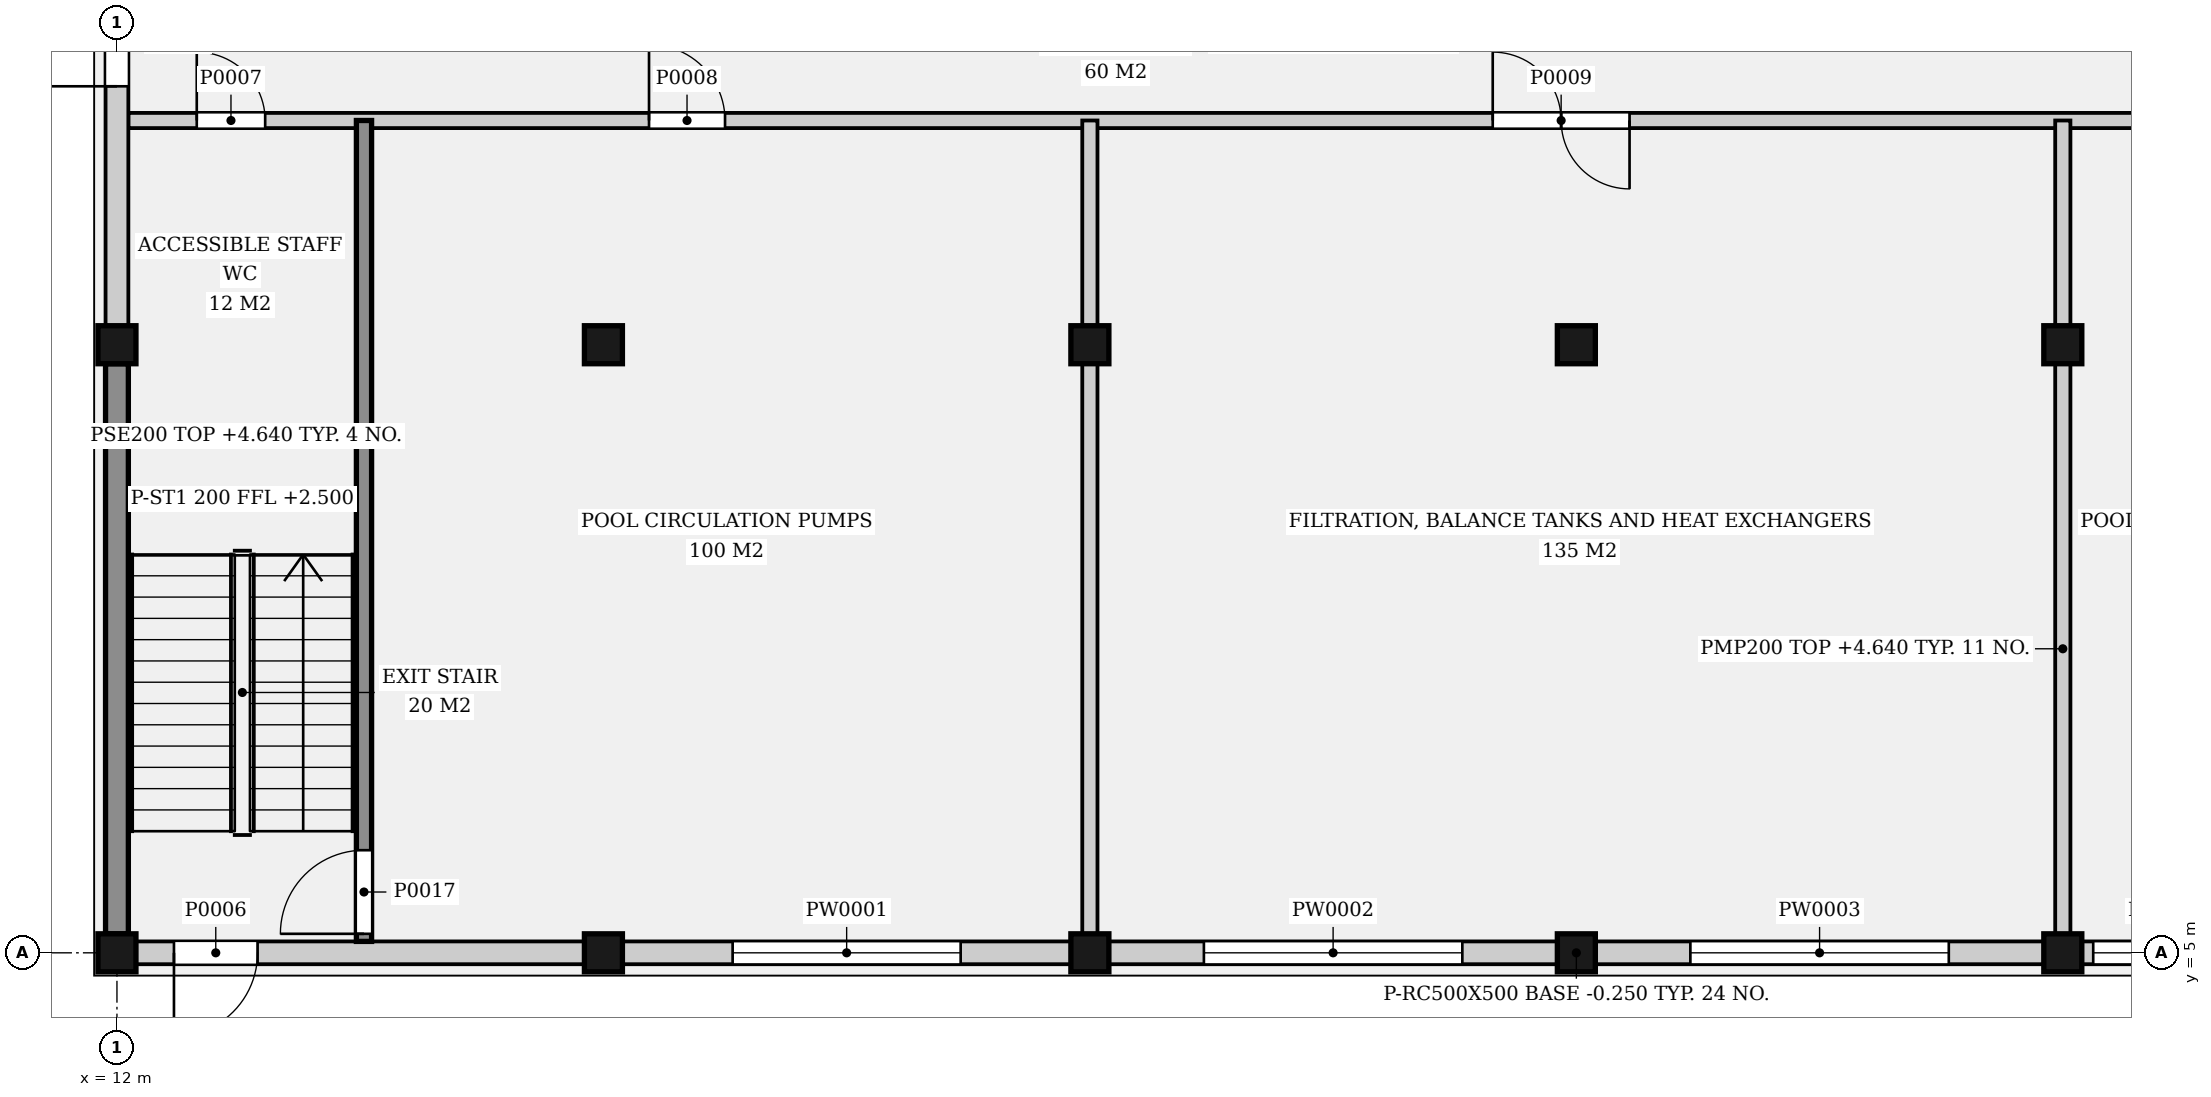
"""IFC4 building model, lengths in metres.
Left out: names, types, materials, properties, quantities, classifications, styles, units other than length and angle.
Written with IfcOpenShell. Run it as: python <this file> out.ifc"""

import sys

from ifc_helpers import new_model, si_unit, direction, frame, frame_2d, origin, origin_2d, place, context, subcontext, project, spatial, rectangle, extrude, element, fill, save


model = new_model("IFC4")
c1 = context("Model", 3, precision=1e-05, world=origin(), true_north=direction((0.0, 1.0)))
c2 = subcontext(c1, "Body", "Model", "MODEL_VIEW")
j1 = project(units=[si_unit("LENGTHUNIT", "METRE"), si_unit("PLANEANGLEUNIT", "RADIAN")], contexts=[c1])
p1 = place(None, origin())
s1 = spatial("IfcSite", under=j1, at=p1, CompositionType="ELEMENT")
p2 = place(p1, origin())
s2 = spatial("IfcBuilding", under=s1, at=p2, CompositionType="ELEMENT")
p3 = place(p2, origin())
s3 = spatial("IfcBuildingStorey", under=s2, at=p3, CompositionType="ELEMENT", Elevation=0.0)
for number, where, z_axis, x_axis in (
    (1, (12.0, 5.0, -0.25), (0.0, 0.0, 1.0), (1.0, 0.0, 0.0)),
    (2, (12.0, 13.0, -0.25), (0.0, 0.0, 1.0), (1.0, 0.0, 0.0)),
    (3, (18.4, 5.0, -0.25), (0.0, 0.0, 1.0), (1.0, 0.0, 0.0)),
    (4, (18.4, 13.0, -0.25), (0.0, 0.0, 1.0), (1.0, 0.0, 0.0)),
    (5, (24.8, 5.0, -0.25), (0.0, 0.0, 1.0), (1.0, 0.0, 0.0)),
    (6, (24.8, 13.0, -0.25), (0.0, 0.0, 1.0), (1.0, 0.0, 0.0)),
    (7, (31.2, 5.0, -0.25), (0.0, 0.0, 1.0), (1.0, 0.0, 0.0)),
    (8, (31.2, 13.0, -0.25), (0.0, 0.0, 1.0), (1.0, 0.0, 0.0)),
    (9, (37.6, 5.0, -0.25), (0.0, 0.0, 1.0), (1.0, 0.0, 0.0)),
    (10, (37.6, 13.0, -0.25), (0.0, 0.0, 1.0), (1.0, 0.0, 0.0)),
):
    element("IfcColumn", number, at=place(p3, frame(where, z_axis=z_axis, x_axis=x_axis)), inside=s3, PredefinedType="COLUMN", context=c2, shape_type="SweptSolid", body=[
        extrude(rectangle(XDim=0.5, YDim=0.5, at=origin_2d()), origin(), (0.0, 0.0, 1.0), 5.25),
    ])
p4 = place(p3, frame((12.25, 5.0, 0.0), z_axis=(0.0, 0.0, 1.0), x_axis=(1.0, 0.0, 0.0)))
e11 = element("IfcWall", 11, at=p4, inside=s3, PredefinedType="SOLIDWALL", context=c2, shape_type="SweptSolid", body=[
    extrude(rectangle(XDim=5.9, YDim=0.3, at=frame_2d((2.95, 0.0))), origin(), (0.0, 0.0, 1.0), 4.64),
])
p5 = place(p4, frame((1.6, 0.0, 0.0), z_axis=(0.0, 0.0, 1.0), x_axis=(-1.0, 0.0, 0.0)))
e12 = element("IfcOpeningElement", 12, at=p5, cuts=e11, PredefinedType="OPENING", context=c2, shape_type="SweptSolid", body=[
    extrude(rectangle(XDim=1.1, YDim=2.1, at=frame_2d((0.55, 1.05))), frame((0.0, 0.16, 0.0), z_axis=(0.0, -1.0, 0.0), x_axis=(1.0, 0.0, 0.0)), (0.0, 0.0, 1.0), 0.32),
])
p6 = place(p3, frame((18.65, 5.0, 0.0), z_axis=(0.0, 0.0, 1.0), x_axis=(1.0, 0.0, 0.0)))
e13 = element("IfcWall", 13, at=p6, inside=s3, PredefinedType="SOLIDWALL", context=c2, shape_type="SweptSolid", body=[
    extrude(rectangle(XDim=5.9, YDim=0.3, at=frame_2d((2.95, 0.0))), origin(), (0.0, 0.0, 1.0), 4.64),
])
p7 = place(p6, frame((1.45, 0.0, 0.6)))
e14 = element("IfcOpeningElement", 14, at=p7, cuts=e13, PredefinedType="OPENING", context=c2, shape_type="SweptSolid", body=[
    extrude(rectangle(XDim=3.0, YDim=2.8, at=frame_2d((1.5, 1.4))), frame((0.0, 0.16, 0.0), z_axis=(0.0, -1.0, 0.0), x_axis=(1.0, 0.0, 0.0)), (0.0, 0.0, 1.0), 0.32),
])
p8 = place(p3, frame((25.05, 5.0, 0.0), z_axis=(0.0, 0.0, 1.0), x_axis=(1.0, 0.0, 0.0)))
e15 = element("IfcWall", 15, at=p8, inside=s3, PredefinedType="SOLIDWALL", context=c2, shape_type="SweptSolid", body=[
    extrude(rectangle(XDim=5.9, YDim=0.3, at=frame_2d((2.95, 0.0))), origin(), (0.0, 0.0, 1.0), 4.64),
])
p9 = place(p8, frame((1.25, 0.0, 0.6)))
e16 = element("IfcOpeningElement", 16, at=p9, cuts=e15, PredefinedType="OPENING", context=c2, shape_type="SweptSolid", body=[
    extrude(rectangle(XDim=3.4, YDim=2.8, at=frame_2d((1.7, 1.4))), frame((0.0, 0.16, 0.0), z_axis=(0.0, -1.0, 0.0), x_axis=(1.0, 0.0, 0.0)), (0.0, 0.0, 1.0), 0.32),
])
p10 = place(p3, frame((31.45, 5.0, 0.0), z_axis=(0.0, 0.0, 1.0), x_axis=(1.0, 0.0, 0.0)))
e17 = element("IfcWall", 17, at=p10, inside=s3, PredefinedType="SOLIDWALL", context=c2, shape_type="SweptSolid", body=[
    extrude(rectangle(XDim=5.9, YDim=0.3, at=frame_2d((2.95, 0.0))), origin(), (0.0, 0.0, 1.0), 4.64),
])
p11 = place(p10, frame((1.25, 0.0, 0.6)))
e18 = element("IfcOpeningElement", 18, at=p11, cuts=e17, PredefinedType="OPENING", context=c2, shape_type="SweptSolid", body=[
    extrude(rectangle(XDim=3.4, YDim=2.8, at=frame_2d((1.7, 1.4))), frame((0.0, 0.16, 0.0), z_axis=(0.0, -1.0, 0.0), x_axis=(1.0, 0.0, 0.0)), (0.0, 0.0, 1.0), 0.32),
])
p12 = place(p3, frame((37.85, 5.0, 0.0), z_axis=(0.0, 0.0, 1.0), x_axis=(1.0, 0.0, 0.0)))
e19 = element("IfcWall", 19, at=p12, inside=s3, PredefinedType="SOLIDWALL", context=c2, shape_type="SweptSolid", body=[
    extrude(rectangle(XDim=5.9, YDim=0.3, at=frame_2d((2.95, 0.0))), origin(), (0.0, 0.0, 1.0), 4.64),
])
p13 = place(p12, frame((0.15, 0.0, 0.9)))
e20 = element("IfcOpeningElement", 20, at=p13, cuts=e19, PredefinedType="OPENING", context=c2, shape_type="SweptSolid", body=[
    extrude(rectangle(XDim=2.0, YDim=2.4, at=frame_2d((1.0, 1.2))), frame((0.0, 0.16, 0.0), z_axis=(0.0, -1.0, 0.0), x_axis=(1.0, 0.0, 0.0)), (0.0, 0.0, 1.0), 0.32),
])
p14 = place(p12, frame((4.15, 0.0, 0.9)))
e21 = element("IfcOpeningElement", 21, at=p14, cuts=e19, PredefinedType="OPENING", context=c2, shape_type="SweptSolid", body=[
    extrude(rectangle(XDim=1.2, YDim=2.4, at=frame_2d((0.6, 1.2))), frame((0.0, 0.16, 0.0), z_axis=(0.0, -1.0, 0.0), x_axis=(1.0, 0.0, 0.0)), (0.0, 0.0, 1.0), 0.32),
])
p15 = place(p3, frame((12.0, 5.25, 0.0), z_axis=(0.0, 0.0, 1.0), x_axis=(0.0, 1.0, 0.0)))
e22 = element("IfcWall", 22, at=p15, inside=s3, PredefinedType="SOLIDWALL", context=c2, shape_type="SweptSolid", body=[
    extrude(rectangle(XDim=7.5, YDim=0.3, at=frame_2d((3.75, 0.0))), origin(), (0.0, 0.0, 1.0), 4.64),
])
p16 = place(p3, frame((12.0, 13.25, 0.0), z_axis=(0.0, 0.0, 1.0), x_axis=(0.0, 1.0, 0.0)))
e23 = element("IfcWall", 23, at=p16, inside=s3, PredefinedType="SOLIDWALL", context=c2, shape_type="SweptSolid", body=[
    extrude(rectangle(XDim=7.5, YDim=0.3, at=frame_2d((3.75, 0.0))), origin(), (0.0, 0.0, 1.0), 4.64),
])
p17 = place(p16, frame((3.15, 0.0, 0.0)))
e24 = element("IfcOpeningElement", 24, at=p17, cuts=e23, PredefinedType="OPENING", context=c2, shape_type="SweptSolid", body=[
    extrude(rectangle(XDim=1.2, YDim=2.1, at=frame_2d((0.6, 1.05))), frame((0.0, 0.16, 0.0), z_axis=(0.0, -1.0, 0.0), x_axis=(1.0, 0.0, 0.0)), (0.0, 0.0, 1.0), 0.32),
])
p18 = place(p3, frame((12.15, 15.95, 0.0), z_axis=(0.0, 0.0, 1.0), x_axis=(1.0, 0.0, 0.0)))
e25 = element("IfcWall", 25, at=p18, inside=s3, PredefinedType="PARTITIONING", context=c2, shape_type="SweptSolid", body=[
    extrude(rectangle(XDim=31.7, YDim=0.2, at=frame_2d((15.85, 0.0))), origin(), (0.0, 0.0, 1.0), 4.64),
])
p19 = place(p18, frame((0.9, 0.0, 0.0)))
e26 = element("IfcOpeningElement", 26, at=p19, cuts=e25, PredefinedType="OPENING", context=c2, shape_type="SweptSolid", body=[
    extrude(rectangle(XDim=0.9, YDim=2.1, at=frame_2d((0.45, 1.05))), frame((0.0, 0.11, 0.0), z_axis=(0.0, -1.0, 0.0), x_axis=(1.0, 0.0, 0.0)), (0.0, 0.0, 1.0), 0.22),
])
p20 = place(p18, frame((6.85, 0.0, 0.0)))
e27 = element("IfcOpeningElement", 27, at=p20, cuts=e25, PredefinedType="OPENING", context=c2, shape_type="SweptSolid", body=[
    extrude(rectangle(XDim=1.0, YDim=2.1, at=frame_2d((0.5, 1.05))), frame((0.0, 0.11, 0.0), z_axis=(0.0, -1.0, 0.0), x_axis=(1.0, 0.0, 0.0)), (0.0, 0.0, 1.0), 0.22),
])
p21 = place(p18, frame((17.95, 0.0, 0.0)))
e28 = element("IfcOpeningElement", 28, at=p21, cuts=e25, PredefinedType="OPENING", context=c2, shape_type="SweptSolid", body=[
    extrude(rectangle(XDim=1.8, YDim=2.4, at=frame_2d((0.9, 1.2))), frame((0.0, 0.11, 0.0), z_axis=(0.0, -1.0, 0.0), x_axis=(1.0, 0.0, 0.0)), (0.0, 0.0, 1.0), 0.22),
])
p22 = place(p18, frame((26.65, 0.0, 0.0)))
e29 = element("IfcOpeningElement", 29, at=p22, cuts=e25, PredefinedType="OPENING", context=c2, shape_type="SweptSolid", body=[
    extrude(rectangle(XDim=1.0, YDim=2.1, at=frame_2d((0.5, 1.05))), frame((0.0, 0.11, 0.0), z_axis=(0.0, -1.0, 0.0), x_axis=(1.0, 0.0, 0.0)), (0.0, 0.0, 1.0), 0.22),
])
p23 = place(p18, frame((29.7, 0.0, 0.0)))
e30 = element("IfcOpeningElement", 30, at=p23, cuts=e25, PredefinedType="OPENING", context=c2, shape_type="SweptSolid", body=[
    extrude(rectangle(XDim=1.1, YDim=2.1, at=frame_2d((0.55, 1.05))), frame((0.0, 0.11, 0.0), z_axis=(0.0, -1.0, 0.0), x_axis=(1.0, 0.0, 0.0)), (0.0, 0.0, 1.0), 0.22),
])
p24 = place(p3, frame((15.25, 5.15, 0.0), z_axis=(0.0, 0.0, 1.0), x_axis=(0.0, 1.0, 0.0)))
e31 = element("IfcWall", 31, at=p24, inside=s3, PredefinedType="SOLIDWALL", context=c2, shape_type="SweptSolid", body=[
    extrude(rectangle(XDim=10.8, YDim=0.2, at=frame_2d((5.4, 0.0))), origin(), (0.0, 0.0, 1.0), 4.64),
])
p25 = place(p24, frame((0.1, 0.0, 0.0)))
e32 = element("IfcOpeningElement", 32, at=p25, cuts=e31, PredefinedType="OPENING", context=c2, shape_type="SweptSolid", body=[
    extrude(rectangle(XDim=1.1, YDim=2.1, at=frame_2d((0.55, 1.05))), frame((0.0, 0.11, 0.0), z_axis=(0.0, -1.0, 0.0), x_axis=(1.0, 0.0, 0.0)), (0.0, 0.0, 1.0), 0.22),
])
p26 = place(p3, frame((24.8, 5.25, 0.0), z_axis=(0.0, 0.0, 1.0), x_axis=(0.0, 1.0, 0.0)))
e33 = element("IfcWall", 33, at=p26, inside=s3, PredefinedType="PARTITIONING", context=c2, shape_type="SweptSolid", body=[
    extrude(rectangle(XDim=7.5, YDim=0.2, at=frame_2d((3.75, 0.0))), origin(), (0.0, 0.0, 1.0), 4.64),
])
p27 = place(p3, frame((24.8, 13.25, 0.0), z_axis=(0.0, 0.0, 1.0), x_axis=(0.0, 1.0, 0.0)))
e34 = element("IfcWall", 34, at=p27, inside=s3, PredefinedType="PARTITIONING", context=c2, shape_type="SweptSolid", body=[
    extrude(rectangle(XDim=2.7, YDim=0.2, at=frame_2d((1.35, 0.0))), origin(), (0.0, 0.0, 1.0), 4.64),
])
p28 = place(p3, frame((37.6, 5.25, 0.0), z_axis=(0.0, 0.0, 1.0), x_axis=(0.0, 1.0, 0.0)))
e35 = element("IfcWall", 35, at=p28, inside=s3, PredefinedType="PARTITIONING", context=c2, shape_type="SweptSolid", body=[
    extrude(rectangle(XDim=7.5, YDim=0.2, at=frame_2d((3.75, 0.0))), origin(), (0.0, 0.0, 1.0), 4.64),
])
p29 = place(p3, frame((37.6, 13.25, 0.0), z_axis=(0.0, 0.0, 1.0), x_axis=(0.0, 1.0, 0.0)))
e36 = element("IfcWall", 36, at=p29, inside=s3, PredefinedType="PARTITIONING", context=c2, shape_type="SweptSolid", body=[
    extrude(rectangle(XDim=2.7, YDim=0.2, at=frame_2d((1.35, 0.0))), origin(), (0.0, 0.0, 1.0), 4.64),
])
p30 = place(p3, frame((12.15, 11.8, 0.0), z_axis=(0.0, 0.0, 1.0), x_axis=(1.0, 0.0, 0.0)))
e37 = element("IfcWall", 37, at=p30, inside=s3, PredefinedType="SOLIDWALL", context=c2, shape_type="SweptSolid", body=[
    extrude(rectangle(XDim=3.1, YDim=0.2, at=frame_2d((1.55, 0.0))), origin(), (0.0, 0.0, 1.0), 4.64),
])
p31 = place(p17, origin())
e38 = element("IfcDoor", 38, at=p31, inside=s3, OperationType="SINGLE_SWING_LEFT", PredefinedType="DOOR", context=c2, shape_type="SweptSolid", body=[
    extrude(rectangle(XDim=1.2, YDim=2.1, at=frame_2d((0.6, 1.05))), frame((0.0, 0.025, 0.0), z_axis=(0.0, -1.0, 0.0), x_axis=(1.0, 0.0, 0.0)), (0.0, 0.0, 1.0), 0.05),
])
fill(e24, e38)
p32 = place(p5, origin())
e39 = element("IfcDoor", 39, at=p32, inside=s3, OperationType="SINGLE_SWING_LEFT", PredefinedType="DOOR", context=c2, shape_type="SweptSolid", body=[
    extrude(rectangle(XDim=1.1, YDim=2.1, at=frame_2d((0.55, 1.05))), frame((0.0, 0.025, 0.0), z_axis=(0.0, -1.0, 0.0), x_axis=(1.0, 0.0, 0.0)), (0.0, 0.0, 1.0), 0.05),
])
fill(e12, e39)
p33 = place(p7, origin())
e40 = element("IfcWindow", 40, at=p33, inside=s3, PartitioningType="SINGLE_PANEL", PredefinedType="USERDEFINED", context=c2, shape_type="SweptSolid", body=[
    extrude(rectangle(XDim=3.0, YDim=2.8, at=frame_2d((1.5, 1.4))), frame((0.0, 0.03, 0.0), z_axis=(0.0, -1.0, 0.0), x_axis=(1.0, 0.0, 0.0)), (0.0, 0.0, 1.0), 0.06),
])
fill(e14, e40)
p34 = place(p9, origin())
e41 = element("IfcWindow", 41, at=p34, inside=s3, PartitioningType="SINGLE_PANEL", PredefinedType="USERDEFINED", context=c2, shape_type="SweptSolid", body=[
    extrude(rectangle(XDim=3.4, YDim=2.8, at=frame_2d((1.7, 1.4))), frame((0.0, 0.03, 0.0), z_axis=(0.0, -1.0, 0.0), x_axis=(1.0, 0.0, 0.0)), (0.0, 0.0, 1.0), 0.06),
])
fill(e16, e41)
p35 = place(p11, origin())
e42 = element("IfcWindow", 42, at=p35, inside=s3, PartitioningType="SINGLE_PANEL", PredefinedType="USERDEFINED", context=c2, shape_type="SweptSolid", body=[
    extrude(rectangle(XDim=3.4, YDim=2.8, at=frame_2d((1.7, 1.4))), frame((0.0, 0.03, 0.0), z_axis=(0.0, -1.0, 0.0), x_axis=(1.0, 0.0, 0.0)), (0.0, 0.0, 1.0), 0.06),
])
fill(e18, e42)
p36 = place(p13, origin())
e43 = element("IfcWindow", 43, at=p36, inside=s3, PartitioningType="SINGLE_PANEL", PredefinedType="USERDEFINED", context=c2, shape_type="SweptSolid", body=[
    extrude(rectangle(XDim=2.0, YDim=2.4, at=frame_2d((1.0, 1.2))), frame((0.0, 0.03, 0.0), z_axis=(0.0, -1.0, 0.0), x_axis=(1.0, 0.0, 0.0)), (0.0, 0.0, 1.0), 0.06),
])
fill(e20, e43)
p37 = place(p19, origin())
e44 = element("IfcDoor", 44, at=p37, inside=s3, OperationType="SINGLE_SWING_LEFT", PredefinedType="DOOR", context=c2, shape_type="SweptSolid", body=[
    extrude(rectangle(XDim=0.9, YDim=2.1, at=frame_2d((0.45, 1.05))), frame((0.0, 0.025, 0.0), z_axis=(0.0, -1.0, 0.0), x_axis=(1.0, 0.0, 0.0)), (0.0, 0.0, 1.0), 0.05),
])
fill(e26, e44)
p38 = place(p20, origin())
e45 = element("IfcDoor", 45, at=p38, inside=s3, OperationType="SINGLE_SWING_LEFT", PredefinedType="DOOR", context=c2, shape_type="SweptSolid", body=[
    extrude(rectangle(XDim=1.0, YDim=2.1, at=frame_2d((0.5, 1.05))), frame((0.0, 0.025, 0.0), z_axis=(0.0, -1.0, 0.0), x_axis=(1.0, 0.0, 0.0)), (0.0, 0.0, 1.0), 0.05),
])
fill(e27, e45)
p39 = place(p21, origin())
e46 = element("IfcDoor", 46, at=p39, inside=s3, OperationType="DOUBLE_DOOR_SINGLE_SWING", PredefinedType="DOOR", context=c2, shape_type="SweptSolid", body=[
    extrude(rectangle(XDim=1.8, YDim=2.4, at=frame_2d((0.9, 1.2))), frame((0.0, 0.025, 0.0), z_axis=(0.0, -1.0, 0.0), x_axis=(1.0, 0.0, 0.0)), (0.0, 0.0, 1.0), 0.05),
])
fill(e28, e46)
p40 = place(p25, origin())
e47 = element("IfcDoor", 47, at=p40, inside=s3, OperationType="SINGLE_SWING_LEFT", PredefinedType="DOOR", context=c2, shape_type="SweptSolid", body=[
    extrude(rectangle(XDim=1.1, YDim=2.1, at=frame_2d((0.55, 1.05))), frame((0.0, 0.025, 0.0), z_axis=(0.0, -1.0, 0.0), x_axis=(1.0, 0.0, 0.0)), (0.0, 0.0, 1.0), 0.05),
])
fill(e32, e47)
save(model, sys.argv[1])
